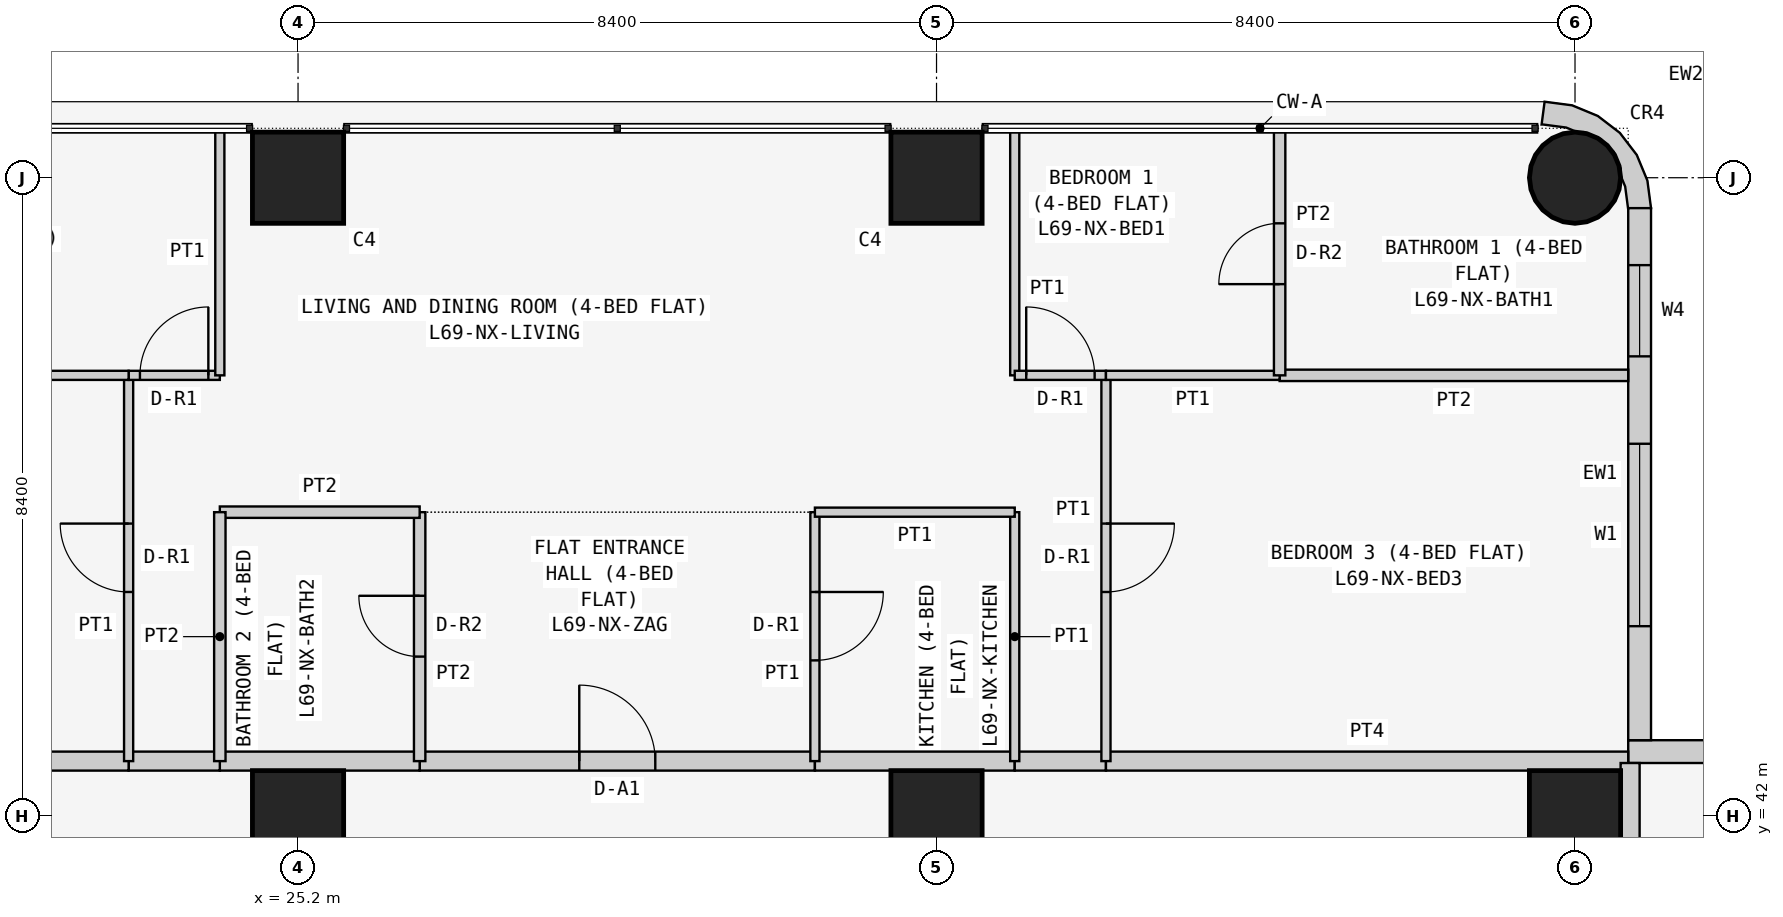
"""IFC4 building model, lengths in metres.
Left out: names, types, materials, properties, quantities, classifications, styles, units other than length and angle.
Written with IfcOpenShell. Run it as: python <this file> out.ifc"""

import sys

from ifc_helpers import new_model, si_unit, direction, frame, frame_2d, origin, origin_2d, place, context, subcontext, project, spatial, polyline, rectangle, circle, outline, extrude, element, fill, save


model = new_model("IFC4")
c1 = context("Model", 3, precision=1e-05, world=origin(), true_north=direction((0.0, 1.0)))
c2 = subcontext(c1, "Body", "Model", "MODEL_VIEW")
j1 = project(units=[si_unit("LENGTHUNIT", "METRE"), si_unit("PLANEANGLEUNIT", "RADIAN")], contexts=[c1])
p1 = place(None, origin())
s1 = spatial("IfcSite", under=j1, at=p1, CompositionType="ELEMENT")
p2 = place(p1, origin())
s2 = spatial("IfcBuilding", under=s1, at=p2, CompositionType="ELEMENT")
p3 = place(p2, frame((0.0, 0.0, 264.9)))
s3 = spatial("IfcBuildingStorey", under=s2, at=p3, CompositionType="ELEMENT", Elevation=264.9)
for number, where, z_axis, x_axis in (
    (1, (25.2, 42.0, 0.0), (0.0, 0.0, 1.0), (1.0, 0.0, 0.0)),
    (2, (25.2, 50.4, 0.0), (0.0, 0.0, 1.0), (1.0, 0.0, 0.0)),
    (3, (33.6, 42.0, 0.0), (0.0, 0.0, 1.0), (1.0, 0.0, 0.0)),
    (4, (33.6, 50.4, 0.0), (0.0, 0.0, 1.0), (1.0, 0.0, 0.0)),
    (5, (42.0, 42.0, 0.0), (0.0, 0.0, 1.0), (1.0, 0.0, 0.0)),
):
    element("IfcColumn", number, at=place(p3, frame(where, z_axis=z_axis, x_axis=x_axis)), inside=s3, PredefinedType="COLUMN", context=c2, shape_type="SweptSolid", body=[
        extrude(rectangle(XDim=1.2, YDim=1.2, at=origin_2d()), origin(), (0.0, 0.0, 1.0), 3.6),
    ])
p4 = place(p3, frame((42.0, 50.4, 0.0), z_axis=(0.0, 0.0, 1.0), x_axis=(1.0, 0.0, 0.0)))
e6 = element("IfcColumn", 6, at=p4, inside=s3, PredefinedType="COLUMN", context=c2, shape_type="SweptSolid", body=[
    extrude(circle(Radius=0.6, at=origin_2d()), origin(), (0.0, 0.0, 1.0), 3.6),
])
p5 = place(p3, frame((50.0, 42.85, 0.0), z_axis=(0.0, 0.0, 1.0), x_axis=(-1.0, 0.0, 0.0)))
e7 = element("IfcWall", 7, at=p5, inside=s3, PredefinedType="SOLIDWALL", context=c2, shape_type="SweptSolid", body=[
    extrude(rectangle(XDim=7.3, YDim=0.3, at=frame_2d((3.65, 0.0))), origin(), (0.0, 0.0, 1.0), 3.45),
])
p6 = place(p5, frame((3.1, 0.0, 0.9)))
e8 = element("IfcOpeningElement", 8, at=p6, cuts=e7, PredefinedType="OPENING", context=c2, shape_type="SweptSolid", body=[
    extrude(rectangle(XDim=2.4, YDim=1.5, at=frame_2d((1.2, 0.75))), frame((0.0, 0.16, 0.0), z_axis=(0.0, -1.0, 0.0), x_axis=(1.0, 0.0, 0.0)), (0.0, 0.0, 1.0), 0.32),
])
p7 = place(p5, frame((0.75, 0.0, 0.9)))
e9 = element("IfcOpeningElement", 9, at=p7, cuts=e7, PredefinedType="OPENING", context=c2, shape_type="SweptSolid", body=[
    extrude(rectangle(XDim=1.2, YDim=1.5, at=frame_2d((0.6, 0.75))), frame((0.0, 0.16, 0.0), z_axis=(0.0, -1.0, 0.0), x_axis=(1.0, 0.0, 0.0)), (0.0, 0.0, 1.0), 0.32),
])
p8 = place(p3, frame((42.85, 43.0, 0.0), z_axis=(0.0, 0.0, 1.0), x_axis=(0.0, 1.0, 0.0)))
e10 = element("IfcWall", 10, at=p8, inside=s3, PredefinedType="SOLIDWALL", context=c2, shape_type="SweptSolid", body=[
    extrude(rectangle(XDim=7.0, YDim=0.3, at=frame_2d((3.5, 0.0))), origin(), (0.0, 0.0, 1.0), 3.45),
])
p9 = place(p8, frame((1.5, 0.0, 0.9)))
e11 = element("IfcOpeningElement", 11, at=p9, cuts=e10, PredefinedType="OPENING", context=c2, shape_type="SweptSolid", body=[
    extrude(rectangle(XDim=2.4, YDim=1.5, at=frame_2d((1.2, 0.75))), frame((0.0, 0.16, 0.0), z_axis=(0.0, -1.0, 0.0), x_axis=(1.0, 0.0, 0.0)), (0.0, 0.0, 1.0), 0.32),
])
p10 = place(p8, frame((5.05, 0.0, 0.9)))
e12 = element("IfcOpeningElement", 12, at=p10, cuts=e10, PredefinedType="OPENING", context=c2, shape_type="SweptSolid", body=[
    extrude(rectangle(XDim=1.2, YDim=1.5, at=frame_2d((0.6, 0.75))), frame((0.0, 0.16, 0.0), z_axis=(0.0, -1.0, 0.0), x_axis=(1.0, 0.0, 0.0)), (0.0, 0.0, 1.0), 0.32),
])
p11 = place(p3, frame((42.576, 50.038, 0.0), z_axis=(0.0, 0.0, 1.0), x_axis=(0.707106781187, 0.707106781187, 0.0)))
e13 = element("IfcWall", 13, at=p11, inside=s3, PredefinedType="SOLIDWALL", context=c2, shape_type="SweptSolid", body=[
    extrude(outline(polyline([(0.233, 0.114), (0.047, -0.129), (0.033, -0.143), (0.273, -0.327), (0.495, -0.037), (0.635, 0.3), (0.683, 0.663), (0.635, 1.025), (0.495, 1.363), (0.273, 1.653), (0.033, 1.469), (0.047, 1.455), (0.233, 1.212), (0.292, 1.069), (0.358, 1.003), (0.449, 0.782), (0.449, 0.543), (0.358, 0.322), (0.292, 0.257), (0.233, 0.114)])), origin(), (0.0, 0.0, 1.0), 3.45),
])
p12 = place(p3, frame((26.8, 42.725, 0.0), z_axis=(0.0, 0.0, 1.0), x_axis=(1.0, 0.0, 0.0)))
e14 = element("IfcWall", 14, at=p12, inside=s3, PredefinedType="PARTITIONING", context=c2, shape_type="SweptSolid", body=[
    extrude(rectangle(XDim=5.2, YDim=0.25, at=frame_2d((2.6, 0.0))), origin(), (0.0, 0.0, 1.0), 3.45),
])
p13 = place(p12, frame((2.1, 0.0, 0.0)))
e15 = element("IfcOpeningElement", 15, at=p13, cuts=e14, PredefinedType="OPENING", context=c2, shape_type="SweptSolid", body=[
    extrude(rectangle(XDim=1.0, YDim=2.1, at=frame_2d((0.5, 1.05))), frame((0.0, 0.135, 0.0), z_axis=(0.0, -1.0, 0.0), x_axis=(1.0, 0.0, 0.0)), (0.0, 0.0, 1.0), 0.27),
])
p14 = place(p3, frame((24.171, 42.725, 0.0), z_axis=(0.0, 0.0, 1.0), x_axis=(1.0, 0.0, 0.0)))
e16 = element("IfcWall", 16, at=p14, inside=s3, PredefinedType="PARTITIONING", context=c2, shape_type="SweptSolid", body=[
    extrude(rectangle(XDim=2.629, YDim=0.25, at=frame_2d((1.314, 0.0))), origin(), (0.0, 0.0, 1.0), 3.45),
])
p15 = place(p3, frame((32.0, 42.725, 0.0), z_axis=(0.0, 0.0, 1.0), x_axis=(1.0, 0.0, 0.0)))
e17 = element("IfcWall", 17, at=p15, inside=s3, PredefinedType="PARTITIONING", context=c2, shape_type="SweptSolid", body=[
    extrude(rectangle(XDim=2.629, YDim=0.25, at=frame_2d((1.314, 0.0))), origin(), (0.0, 0.0, 1.0), 3.45),
])
p16 = place(p3, frame((22.971, 42.725, 0.0), z_axis=(0.0, 0.0, 1.0), x_axis=(1.0, 0.0, 0.0)))
e18 = element("IfcWall", 18, at=p16, inside=s3, PredefinedType="PARTITIONING", context=c2, shape_type="SweptSolid", body=[
    extrude(rectangle(XDim=1.2, YDim=0.25, at=frame_2d((0.6, 0.0))), origin(), (0.0, 0.0, 1.0), 3.45),
])
p17 = place(p3, frame((34.629, 42.725, 0.0), z_axis=(0.0, 0.0, 1.0), x_axis=(1.0, 0.0, 0.0)))
e19 = element("IfcWall", 19, at=p17, inside=s3, PredefinedType="PARTITIONING", context=c2, shape_type="SweptSolid", body=[
    extrude(rectangle(XDim=1.2, YDim=0.25, at=frame_2d((0.6, 0.0))), origin(), (0.0, 0.0, 1.0), 3.45),
])
for number, where, z_axis, x_axis in (
    (20, (16.1, 42.725, 0.0), (0.0, 0.0, 1.0), (1.0, 0.0, 0.0)),
    (21, (35.829, 42.725, 0.0), (0.0, 0.0, 1.0), (1.0, 0.0, 0.0)),
    (22, (42.725, 42.7, 0.0), (0.0, 0.0, 1.0), (0.0, -1.0, 0.0)),
):
    element("IfcWall", number, at=place(p3, frame(where, z_axis=z_axis, x_axis=x_axis)), inside=s3, PredefinedType="PARTITIONING", context=c2, shape_type="SweptSolid", body=[
        extrude(rectangle(XDim=6.871, YDim=0.25, at=frame_2d((3.436, 0.0))), origin(), (0.0, 0.0, 1.0), 3.45),
    ])
p18 = place(p3, frame((26.8, 46.0, 0.0), z_axis=(0.0, 0.0, 1.0), x_axis=(0.0, -1.0, 0.0)))
e23 = element("IfcWall", 23, at=p18, inside=s3, PredefinedType="PARTITIONING", context=c2, shape_type="SweptSolid", body=[
    extrude(rectangle(XDim=3.275, YDim=0.15, at=frame_2d((1.637, 0.0))), origin(), (0.0, 0.0, 1.0), 3.45),
])
p19 = place(p18, frame((1.1, 0.0, 0.0)))
e24 = element("IfcOpeningElement", 24, at=p19, cuts=e23, PredefinedType="OPENING", context=c2, shape_type="SweptSolid", body=[
    extrude(rectangle(XDim=0.8, YDim=2.1, at=frame_2d((0.4, 1.05))), frame((0.0, 0.085, 0.0), z_axis=(0.0, -1.0, 0.0), x_axis=(1.0, 0.0, 0.0)), (0.0, 0.0, 1.0), 0.17),
])
p20 = place(p3, frame((32.0, 42.725, 0.0), z_axis=(0.0, 0.0, 1.0), x_axis=(0.0, 1.0, 0.0)))
e25 = element("IfcWall", 25, at=p20, inside=s3, PredefinedType="PARTITIONING", context=c2, shape_type="SweptSolid", body=[
    extrude(rectangle(XDim=3.275, YDim=0.12, at=frame_2d((1.637, 0.0))), origin(), (0.0, 0.0, 1.0), 3.45),
])
p21 = place(p20, frame((1.325, 0.0, 0.0)))
e26 = element("IfcOpeningElement", 26, at=p21, cuts=e25, PredefinedType="OPENING", context=c2, shape_type="SweptSolid", body=[
    extrude(rectangle(XDim=0.9, YDim=2.1, at=frame_2d((0.45, 1.05))), frame((0.0, 0.07, 0.0), z_axis=(0.0, -1.0, 0.0), x_axis=(1.0, 0.0, 0.0)), (0.0, 0.0, 1.0), 0.14),
])
p22 = place(p3, frame((26.8, 46.0, 0.0), z_axis=(0.0, 0.0, 1.0), x_axis=(-1.0, 0.0, 0.0)))
e27 = element("IfcWall", 27, at=p22, inside=s3, PredefinedType="PARTITIONING", context=c2, shape_type="SweptSolid", body=[
    extrude(rectangle(XDim=2.629, YDim=0.15, at=frame_2d((1.314, 0.0))), origin(), (0.0, 0.0, 1.0), 3.45),
])
p23 = place(p3, frame((24.171, 46.0, 0.0), z_axis=(0.0, 0.0, 1.0), x_axis=(0.0, -1.0, 0.0)))
e28 = element("IfcWall", 28, at=p23, inside=s3, PredefinedType="PARTITIONING", context=c2, shape_type="SweptSolid", body=[
    extrude(rectangle(XDim=3.275, YDim=0.15, at=frame_2d((1.637, 0.0))), origin(), (0.0, 0.0, 1.0), 3.45),
])
p24 = place(p3, frame((34.629, 42.725, 0.0), z_axis=(0.0, 0.0, 1.0), x_axis=(0.0, 1.0, 0.0)))
e29 = element("IfcWall", 29, at=p24, inside=s3, PredefinedType="PARTITIONING", context=c2, shape_type="SweptSolid", body=[
    extrude(rectangle(XDim=3.275, YDim=0.12, at=frame_2d((1.637, 0.0))), origin(), (0.0, 0.0, 1.0), 3.45),
])
p25 = place(p3, frame((34.629, 46.0, 0.0), z_axis=(0.0, 0.0, 1.0), x_axis=(-1.0, 0.0, 0.0)))
e30 = element("IfcWall", 30, at=p25, inside=s3, PredefinedType="PARTITIONING", context=c2, shape_type="SweptSolid", body=[
    extrude(rectangle(XDim=2.629, YDim=0.12, at=frame_2d((1.314, 0.0))), origin(), (0.0, 0.0, 1.0), 3.45),
])
p26 = place(p3, frame((22.971, 42.725, 0.0), z_axis=(0.0, 0.0, 1.0), x_axis=(0.0, 1.0, 0.0)))
e31 = element("IfcWall", 31, at=p26, inside=s3, PredefinedType="PARTITIONING", context=c2, shape_type="SweptSolid", body=[
    extrude(rectangle(XDim=5.075, YDim=0.12, at=frame_2d((2.538, 0.0))), origin(), (0.0, 0.0, 1.0), 3.45),
])
p27 = place(p26, frame((2.225, 0.0, 0.0)))
e32 = element("IfcOpeningElement", 32, at=p27, cuts=e31, PredefinedType="OPENING", context=c2, shape_type="SweptSolid", body=[
    extrude(rectangle(XDim=0.9, YDim=2.1, at=frame_2d((0.45, 1.05))), frame((0.0, 0.07, 0.0), z_axis=(0.0, -1.0, 0.0), x_axis=(1.0, 0.0, 0.0)), (0.0, 0.0, 1.0), 0.14),
])
p28 = place(p3, frame((22.971, 47.8, 0.0), z_axis=(0.0, 0.0, 1.0), x_axis=(1.0, 0.0, 0.0)))
e33 = element("IfcWall", 33, at=p28, inside=s3, PredefinedType="PARTITIONING", context=c2, shape_type="SweptSolid", body=[
    extrude(rectangle(XDim=1.2, YDim=0.12, at=frame_2d((0.6, 0.0))), origin(), (0.0, 0.0, 1.0), 3.45),
])
p29 = place(p28, frame((0.149, 0.0, 0.0)))
e34 = element("IfcOpeningElement", 34, at=p29, cuts=e33, PredefinedType="OPENING", context=c2, shape_type="SweptSolid", body=[
    extrude(rectangle(XDim=0.9, YDim=2.1, at=frame_2d((0.45, 1.05))), frame((0.0, 0.07, 0.0), z_axis=(0.0, -1.0, 0.0), x_axis=(1.0, 0.0, 0.0)), (0.0, 0.0, 1.0), 0.14),
])
p30 = place(p3, frame((24.171, 47.8, 0.0), z_axis=(0.0, 0.0, 1.0), x_axis=(0.0, 1.0, 0.0)))
e35 = element("IfcWall", 35, at=p30, inside=s3, PredefinedType="PARTITIONING", context=c2, shape_type="SweptSolid", body=[
    extrude(rectangle(XDim=3.25, YDim=0.12, at=frame_2d((1.625, 0.0))), origin(), (0.0, 0.0, 1.0), 3.45),
])
p31 = place(p3, frame((35.829, 47.8, 0.0), z_axis=(0.0, 0.0, 1.0), x_axis=(0.0, -1.0, 0.0)))
e36 = element("IfcWall", 36, at=p31, inside=s3, PredefinedType="PARTITIONING", context=c2, shape_type="SweptSolid", body=[
    extrude(rectangle(XDim=5.075, YDim=0.12, at=frame_2d((2.538, 0.0))), origin(), (0.0, 0.0, 1.0), 3.45),
])
p32 = place(p31, frame((1.95, 0.0, 0.0)))
e37 = element("IfcOpeningElement", 37, at=p32, cuts=e36, PredefinedType="OPENING", context=c2, shape_type="SweptSolid", body=[
    extrude(rectangle(XDim=0.9, YDim=2.1, at=frame_2d((0.45, 1.05))), frame((0.0, 0.07, 0.0), z_axis=(0.0, -1.0, 0.0), x_axis=(1.0, 0.0, 0.0)), (0.0, 0.0, 1.0), 0.14),
])
p33 = place(p3, frame((34.629, 51.05, 0.0), z_axis=(0.0, 0.0, 1.0), x_axis=(0.0, -1.0, 0.0)))
e38 = element("IfcWall", 38, at=p33, inside=s3, PredefinedType="PARTITIONING", context=c2, shape_type="SweptSolid", body=[
    extrude(rectangle(XDim=3.25, YDim=0.12, at=frame_2d((1.625, 0.0))), origin(), (0.0, 0.0, 1.0), 3.45),
])
p34 = place(p3, frame((34.629, 47.8, 0.0), z_axis=(0.0, 0.0, 1.0), x_axis=(1.0, 0.0, 0.0)))
e39 = element("IfcWall", 39, at=p34, inside=s3, PredefinedType="PARTITIONING", context=c2, shape_type="SweptSolid", body=[
    extrude(rectangle(XDim=1.2, YDim=0.12, at=frame_2d((0.6, 0.0))), origin(), (0.0, 0.0, 1.0), 3.45),
])
p35 = place(p34, frame((0.151, 0.0, 0.0)))
e40 = element("IfcOpeningElement", 40, at=p35, cuts=e39, PredefinedType="OPENING", context=c2, shape_type="SweptSolid", body=[
    extrude(rectangle(XDim=0.9, YDim=2.1, at=frame_2d((0.45, 1.05))), frame((0.0, 0.07, 0.0), z_axis=(0.0, -1.0, 0.0), x_axis=(1.0, 0.0, 0.0)), (0.0, 0.0, 1.0), 0.14),
])
p36 = place(p3, frame((22.971, 47.8, 0.0), z_axis=(0.0, 0.0, 1.0), x_axis=(-1.0, 0.0, 0.0)))
e41 = element("IfcWall", 41, at=p36, inside=s3, PredefinedType="PARTITIONING", context=c2, shape_type="SweptSolid", body=[
    extrude(rectangle(XDim=6.871, YDim=0.12, at=frame_2d((3.436, 0.0))), origin(), (0.0, 0.0, 1.0), 3.45),
])
p37 = place(p3, frame((42.7, 47.8, 0.0), z_axis=(0.0, 0.0, 1.0), x_axis=(-1.0, 0.0, 0.0)))
e42 = element("IfcWall", 42, at=p37, inside=s3, PredefinedType="PARTITIONING", context=c2, shape_type="SweptSolid", body=[
    extrude(rectangle(XDim=4.586, YDim=0.15, at=frame_2d((2.293, 0.0))), origin(), (0.0, 0.0, 1.0), 3.45),
])
p38 = place(p3, frame((38.114, 47.8, 0.0), z_axis=(0.0, 0.0, 1.0), x_axis=(-1.0, 0.0, 0.0)))
e43 = element("IfcWall", 43, at=p38, inside=s3, PredefinedType="PARTITIONING", context=c2, shape_type="SweptSolid", body=[
    extrude(rectangle(XDim=2.285, YDim=0.12, at=frame_2d((1.143, 0.0))), origin(), (0.0, 0.0, 1.0), 3.45),
])
p39 = place(p3, frame((38.114, 51.05, 0.0), z_axis=(0.0, 0.0, 1.0), x_axis=(0.0, -1.0, 0.0)))
e44 = element("IfcWall", 44, at=p39, inside=s3, PredefinedType="PARTITIONING", context=c2, shape_type="SweptSolid", body=[
    extrude(rectangle(XDim=3.25, YDim=0.15, at=frame_2d((1.625, 0.0))), origin(), (0.0, 0.0, 1.0), 3.45),
])
p40 = place(p39, frame((1.25, 0.0, 0.0)))
e45 = element("IfcOpeningElement", 45, at=p40, cuts=e44, PredefinedType="OPENING", context=c2, shape_type="SweptSolid", body=[
    extrude(rectangle(XDim=0.8, YDim=2.1, at=frame_2d((0.4, 1.05))), frame((0.0, 0.085, 0.0), z_axis=(0.0, -1.0, 0.0), x_axis=(1.0, 0.0, 0.0)), (0.0, 0.0, 1.0), 0.17),
])
p41 = place(p9, origin())
e46 = element("IfcWindow", 46, at=p41, inside=s3, PartitioningType="SINGLE_PANEL", PredefinedType="WINDOW", context=c2, shape_type="SweptSolid", body=[
    extrude(rectangle(XDim=2.4, YDim=1.5, at=frame_2d((1.2, 0.75))), frame((0.0, 0.03, 0.0), z_axis=(0.0, -1.0, 0.0), x_axis=(1.0, 0.0, 0.0)), (0.0, 0.0, 1.0), 0.06),
])
fill(e11, e46)
p42 = place(p10, origin())
e47 = element("IfcWindow", 47, at=p42, inside=s3, PartitioningType="SINGLE_PANEL", PredefinedType="WINDOW", context=c2, shape_type="SweptSolid", body=[
    extrude(rectangle(XDim=1.2, YDim=1.5, at=frame_2d((0.6, 0.75))), frame((0.0, 0.03, 0.0), z_axis=(0.0, -1.0, 0.0), x_axis=(1.0, 0.0, 0.0)), (0.0, 0.0, 1.0), 0.06),
])
fill(e12, e47)
p43 = place(p13, origin())
e48 = element("IfcDoor", 48, at=p43, inside=s3, OperationType="SINGLE_SWING_LEFT", PredefinedType="DOOR", context=c2, shape_type="SweptSolid", body=[
    extrude(rectangle(XDim=1.0, YDim=2.1, at=frame_2d((0.5, 1.05))), frame((0.0, 0.025, 0.0), z_axis=(0.0, -1.0, 0.0), x_axis=(1.0, 0.0, 0.0)), (0.0, 0.0, 1.0), 0.05),
])
fill(e15, e48)
p44 = place(p19, frame((0.8, 0.0, 0.0), z_axis=(0.0, 0.0, 1.0), x_axis=(-1.0, 0.0, 0.0)))
e49 = element("IfcDoor", 49, at=p44, inside=s3, OperationType="SINGLE_SWING_RIGHT", PredefinedType="DOOR", context=c2, shape_type="SweptSolid", body=[
    extrude(rectangle(XDim=0.8, YDim=2.1, at=frame_2d((0.4, 1.05))), frame((0.0, 0.025, 0.0), z_axis=(0.0, -1.0, 0.0), x_axis=(1.0, 0.0, 0.0)), (0.0, 0.0, 1.0), 0.05),
])
fill(e24, e49)
p45 = place(p21, frame((0.9, 0.0, 0.0), z_axis=(0.0, 0.0, 1.0), x_axis=(-1.0, 0.0, 0.0)))
e50 = element("IfcDoor", 50, at=p45, inside=s3, OperationType="SINGLE_SWING_LEFT", PredefinedType="DOOR", context=c2, shape_type="SweptSolid", body=[
    extrude(rectangle(XDim=0.9, YDim=2.1, at=frame_2d((0.45, 1.05))), frame((0.0, 0.025, 0.0), z_axis=(0.0, -1.0, 0.0), x_axis=(1.0, 0.0, 0.0)), (0.0, 0.0, 1.0), 0.05),
])
fill(e26, e50)
p46 = place(p27, origin())
e51 = element("IfcDoor", 51, at=p46, inside=s3, OperationType="SINGLE_SWING_RIGHT", PredefinedType="DOOR", context=c2, shape_type="SweptSolid", body=[
    extrude(rectangle(XDim=0.9, YDim=2.1, at=frame_2d((0.45, 1.05))), frame((0.0, 0.025, 0.0), z_axis=(0.0, -1.0, 0.0), x_axis=(1.0, 0.0, 0.0)), (0.0, 0.0, 1.0), 0.05),
])
fill(e32, e51)
p47 = place(p29, origin())
e52 = element("IfcDoor", 52, at=p47, inside=s3, OperationType="SINGLE_SWING_RIGHT", PredefinedType="DOOR", context=c2, shape_type="SweptSolid", body=[
    extrude(rectangle(XDim=0.9, YDim=2.1, at=frame_2d((0.45, 1.05))), frame((0.0, 0.025, 0.0), z_axis=(0.0, -1.0, 0.0), x_axis=(1.0, 0.0, 0.0)), (0.0, 0.0, 1.0), 0.05),
])
fill(e34, e52)
p48 = place(p32, origin())
e53 = element("IfcDoor", 53, at=p48, inside=s3, OperationType="SINGLE_SWING_LEFT", PredefinedType="DOOR", context=c2, shape_type="SweptSolid", body=[
    extrude(rectangle(XDim=0.9, YDim=2.1, at=frame_2d((0.45, 1.05))), frame((0.0, 0.025, 0.0), z_axis=(0.0, -1.0, 0.0), x_axis=(1.0, 0.0, 0.0)), (0.0, 0.0, 1.0), 0.05),
])
fill(e37, e53)
p49 = place(p35, origin())
e54 = element("IfcDoor", 54, at=p49, inside=s3, OperationType="SINGLE_SWING_LEFT", PredefinedType="DOOR", context=c2, shape_type="SweptSolid", body=[
    extrude(rectangle(XDim=0.9, YDim=2.1, at=frame_2d((0.45, 1.05))), frame((0.0, 0.025, 0.0), z_axis=(0.0, -1.0, 0.0), x_axis=(1.0, 0.0, 0.0)), (0.0, 0.0, 1.0), 0.05),
])
fill(e40, e54)
p50 = place(p40, frame((0.8, 0.0, 0.0), z_axis=(0.0, 0.0, 1.0), x_axis=(-1.0, 0.0, 0.0)))
e55 = element("IfcDoor", 55, at=p50, inside=s3, OperationType="SINGLE_SWING_LEFT", PredefinedType="DOOR", context=c2, shape_type="SweptSolid", body=[
    extrude(rectangle(XDim=0.8, YDim=2.1, at=frame_2d((0.4, 1.05))), frame((0.0, 0.025, 0.0), z_axis=(0.0, -1.0, 0.0), x_axis=(1.0, 0.0, 0.0)), (0.0, 0.0, 1.0), 0.05),
])
fill(e45, e55)
save(model, sys.argv[1])
